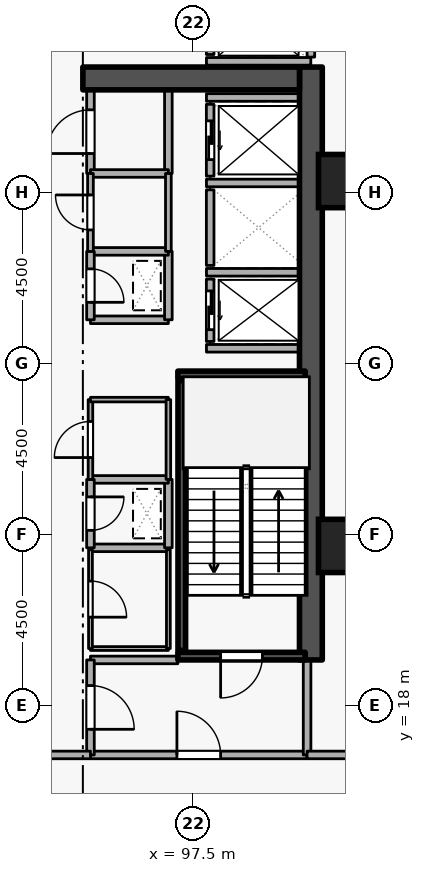
"""IFC4 building model, lengths in metres.
Left out: names, types, materials, properties, quantities, classifications, styles, units other than length and angle.
Written with IfcOpenShell. Run it as: python <this file> out.ifc"""

import sys

from ifc_helpers import new_model, si_unit, direction, frame, frame_2d, origin, origin_2d, place, context, subcontext, project, spatial, rectangle, extrude, element, fill, save


model = new_model("IFC4")
c1 = context("Model", 3, precision=1e-05, world=origin(), true_north=direction((0.0, 1.0)))
c2 = subcontext(c1, "Body", "Model", "MODEL_VIEW")
j1 = project(units=[si_unit("LENGTHUNIT", "METRE"), si_unit("PLANEANGLEUNIT", "RADIAN")], contexts=[c1])
p1 = place(None, origin())
s1 = spatial("IfcSite", under=j1, at=p1, CompositionType="ELEMENT")
p2 = place(p1, origin())
s2 = spatial("IfcBuilding", under=s1, at=p2, CompositionType="ELEMENT")
p3 = place(p2, frame((0.0, 0.0, 71.7)))
s3 = spatial("IfcBuildingStorey", under=s2, at=p3, CompositionType="ELEMENT", Elevation=71.7)
p4 = place(p3, frame((100.6, 19.2, 0.0), z_axis=(0.0, 0.0, 1.0), x_axis=(0.0, 1.0, 0.0)))
e1 = element("IfcWall", 1, at=p4, inside=s3, PredefinedType="SHEAR", context=c2, shape_type="SweptSolid", body=[
    extrude(rectangle(XDim=15.6, YDim=0.6, at=frame_2d((7.8, 0.0))), origin(), (0.0, 0.0, 1.0), 4.2),
])
p5 = place(p3, frame((94.6, 34.5, 0.0), z_axis=(0.0, 0.0, 1.0), x_axis=(1.0, 0.0, 0.0)))
e2 = element("IfcWall", 2, at=p5, inside=s3, PredefinedType="SHEAR", context=c2, shape_type="SweptSolid", body=[
    extrude(rectangle(XDim=5.7, YDim=0.6, at=frame_2d((2.85, 0.0))), origin(), (0.0, 0.0, 1.0), 4.2),
])
for number, where, z_axis, x_axis in (
    (3, (101.5, 22.2, 0.0), (0.0, 0.0, 1.0), (1.0, 0.0, 0.0)),
    (4, (101.5, 31.8, 0.0), (0.0, 0.0, 1.0), (1.0, 0.0, 0.0)),
):
    element("IfcColumn", number, at=place(p3, frame(where, z_axis=z_axis, x_axis=x_axis)), inside=s3, PredefinedType="COLUMN", context=c2, shape_type="SweptSolid", body=[
        extrude(rectangle(XDim=1.4, YDim=1.4, at=origin_2d()), origin(), (0.0, 0.0, 1.0), 4.2),
    ])
p6 = place(p3, frame((97.95, 29.22, 0.0), z_axis=(0.0, 0.0, 1.0), x_axis=(0.0, -1.0, 0.0)))
e5 = element("IfcWall", 5, at=p6, inside=s3, PredefinedType="STANDARD", context=c2, shape_type="SweptSolid", body=[
    extrude(rectangle(XDim=1.64, YDim=0.2, at=frame_2d((0.82, 0.0))), origin(), (0.0, 0.0, 1.0), 3.86),
])
p7 = place(p6, frame((0.31, 0.0, 0.0)))
e6 = element("IfcOpeningElement", 6, at=p7, cuts=e5, PredefinedType="OPENING", context=c2, shape_type="SweptSolid", body=[
    extrude(rectangle(XDim=1.02, YDim=2.06, at=frame_2d((0.51, 1.03))), frame((0.0, 0.11, 0.0), z_axis=(0.0, -1.0, 0.0), x_axis=(1.0, 0.0, 0.0)), (0.0, 0.0, 1.0), 0.22),
])
p8 = place(p3, frame((97.95, 31.57, 0.0), z_axis=(0.0, 0.0, 1.0), x_axis=(0.0, -1.0, 0.0)))
e7 = element("IfcWall", 7, at=p8, inside=s3, PredefinedType="STANDARD", context=c2, shape_type="SweptSolid", body=[
    extrude(rectangle(XDim=1.99, YDim=0.2, at=frame_2d((0.995, 0.0))), origin(), (0.0, 0.0, 1.0), 3.86),
])
p9 = place(p3, frame((97.95, 33.82, 0.0), z_axis=(0.0, 0.0, 1.0), x_axis=(0.0, -1.0, 0.0)))
e8 = element("IfcWall", 8, at=p9, inside=s3, PredefinedType="STANDARD", context=c2, shape_type="SweptSolid", body=[
    extrude(rectangle(XDim=1.89, YDim=0.2, at=frame_2d((0.945, 0.0))), origin(), (0.0, 0.0, 1.0), 3.86),
])
p10 = place(p9, frame((0.435, 0.0, 0.0)))
e9 = element("IfcOpeningElement", 9, at=p10, cuts=e8, PredefinedType="OPENING", context=c2, shape_type="SweptSolid", body=[
    extrude(rectangle(XDim=1.02, YDim=2.06, at=frame_2d((0.51, 1.03))), frame((0.0, 0.11, 0.0), z_axis=(0.0, -1.0, 0.0), x_axis=(1.0, 0.0, 0.0)), (0.0, 0.0, 1.0), 0.22),
])
p11 = place(p3, frame((97.95, 36.87, 0.0), z_axis=(0.0, 0.0, 1.0), x_axis=(0.0, -1.0, 0.0)))
e10 = element("IfcWall", 10, at=p11, inside=s3, PredefinedType="STANDARD", context=c2, shape_type="SweptSolid", body=[
    extrude(rectangle(XDim=1.74, YDim=0.2, at=frame_2d((0.87, 0.0))), origin(), (0.0, 0.0, 1.0), 3.86),
])
p12 = place(p11, frame((0.36, 0.0, 0.0)))
e11 = element("IfcOpeningElement", 11, at=p12, cuts=e10, PredefinedType="OPENING", context=c2, shape_type="SweptSolid", body=[
    extrude(rectangle(XDim=1.02, YDim=2.06, at=frame_2d((0.51, 1.03))), frame((0.0, 0.11, 0.0), z_axis=(0.0, -1.0, 0.0), x_axis=(1.0, 0.0, 0.0)), (0.0, 0.0, 1.0), 0.22),
])
for number, where, z_axis, x_axis in (
    (12, (97.852, 29.4, 0.0), (0.0, 0.0, 1.0), (1.0, 0.0, 0.0)),
    (13, (97.852, 27.4, 0.0), (0.0, 0.0, 1.0), (1.0, 0.0, 0.0)),
    (14, (97.852, 31.75, 0.0), (0.0, 0.0, 1.0), (1.0, 0.0, 0.0)),
    (15, (97.852, 34.0, 0.0), (0.0, 0.0, 1.0), (1.0, 0.0, 0.0)),
):
    element("IfcWall", number, at=place(p3, frame(where, z_axis=z_axis, x_axis=x_axis)), inside=s3, PredefinedType="STANDARD", context=c2, shape_type="SweptSolid", body=[
        extrude(rectangle(XDim=2.436, YDim=0.2, at=frame_2d((1.218, 0.0))), origin(), (0.0, 0.0, 1.0), 3.86),
    ])
p13 = place(p3, frame((97.852, 34.95, 0.0), z_axis=(0.0, 0.0, 1.0), x_axis=(1.0, 0.0, 0.0)))
e16 = element("IfcWall", 16, at=p13, inside=s3, PredefinedType="STANDARD", context=c2, shape_type="SweptSolid", body=[
    extrude(rectangle(XDim=2.746, YDim=0.2, at=frame_2d((1.373, 0.0))), origin(), (0.0, 0.0, 1.0), 3.86),
])
p14 = place(p3, frame((100.6, 35.062, 0.0), z_axis=(0.0, 0.0, 1.0), x_axis=(0.0, 1.0, 0.0)))
e17 = element("IfcWall", 17, at=p14, inside=s3, PredefinedType="STANDARD", context=c2, shape_type="SweptSolid", body=[
    extrude(rectangle(XDim=1.856, YDim=0.2, at=frame_2d((0.928, 0.0))), origin(), (0.0, 0.0, 1.0), 3.86),
])
p15 = place(p3, frame((100.45, 19.3, 0.0), z_axis=(0.0, 0.0, 1.0), x_axis=(-1.0, 0.0, 0.0)))
e18 = element("IfcWall", 18, at=p15, inside=s3, PredefinedType="SHEAR", context=c2, shape_type="SweptSolid", body=[
    extrude(rectangle(XDim=3.35, YDim=0.2, at=frame_2d((1.675, 0.0))), origin(), (0.0, 0.0, 1.0), 4.2),
])
p16 = place(p15, frame((1.125, 0.0, 0.0)))
e19 = element("IfcOpeningElement", 19, at=p16, cuts=e18, PredefinedType="OPENING", context=c2, shape_type="SweptSolid", body=[
    extrude(rectangle(XDim=1.1, YDim=2.1, at=frame_2d((0.55, 1.05))), frame((0.0, 0.11, 0.0), z_axis=(0.0, -1.0, 0.0), x_axis=(1.0, 0.0, 0.0)), (0.0, 0.0, 1.0), 0.22),
])
p17 = place(p3, frame((97.1, 26.7, 0.0), z_axis=(0.0, 0.0, 1.0), x_axis=(1.0, 0.0, 0.0)))
e20 = element("IfcWall", 20, at=p17, inside=s3, PredefinedType="SHEAR", context=c2, shape_type="SweptSolid", body=[
    extrude(rectangle(XDim=3.35, YDim=0.2, at=frame_2d((1.675, 0.0))), origin(), (0.0, 0.0, 1.0), 4.2),
])
p18 = place(p3, frame((97.203, 26.55, 0.0), z_axis=(0.0, 0.0, 1.0), x_axis=(0.0, -1.0, 0.0)))
e21 = element("IfcWall", 21, at=p18, inside=s3, PredefinedType="SHEAR", context=c2, shape_type="SweptSolid", body=[
    extrude(rectangle(XDim=7.1, YDim=0.2, at=frame_2d((3.55, 0.0))), origin(), (0.0, 0.0, 1.0), 4.2),
])
p19 = place(p3, frame((94.8, 16.7, 0.0), z_axis=(0.0, 0.0, 1.0), x_axis=(1.0, 0.0, 0.0)))
e22 = element("IfcWall", 22, at=p19, inside=s3, PredefinedType="STANDARD", context=c2, shape_type="SweptSolid", body=[
    extrude(rectangle(XDim=5.7, YDim=0.2, at=frame_2d((2.85, 0.0))), origin(), (0.0, 0.0, 1.0), 3.86),
])
p20 = place(p19, frame((2.275, 0.0, 0.0)))
e23 = element("IfcOpeningElement", 23, at=p20, cuts=e22, PredefinedType="OPENING", context=c2, shape_type="SweptSolid", body=[
    extrude(rectangle(XDim=1.15, YDim=2.1, at=frame_2d((0.575, 1.05))), frame((0.0, 0.11, 0.0), z_axis=(0.0, -1.0, 0.0), x_axis=(1.0, 0.0, 0.0)), (0.0, 0.0, 1.0), 0.22),
])
p21 = place(p3, frame((100.5, 16.7, 0.0), z_axis=(0.0, 0.0, 1.0), x_axis=(0.0, 1.0, 0.0)))
e24 = element("IfcWall", 24, at=p21, inside=s3, PredefinedType="STANDARD", context=c2, shape_type="SweptSolid", body=[
    extrude(rectangle(XDim=2.5, YDim=0.2, at=frame_2d((1.25, 0.0))), origin(), (0.0, 0.0, 1.0), 3.86),
])
p22 = place(p3, frame((97.1, 19.2, 0.0), z_axis=(0.0, 0.0, 1.0), x_axis=(-1.0, 0.0, 0.0)))
e25 = element("IfcWall", 25, at=p22, inside=s3, PredefinedType="STANDARD", context=c2, shape_type="SweptSolid", body=[
    extrude(rectangle(XDim=2.3, YDim=0.2, at=frame_2d((1.15, 0.0))), origin(), (0.0, 0.0, 1.0), 3.065),
])
p23 = place(p3, frame((94.8, 19.2, 0.0), z_axis=(0.0, 0.0, 1.0), x_axis=(0.0, -1.0, 0.0)))
e26 = element("IfcWall", 26, at=p23, inside=s3, PredefinedType="STANDARD", context=c2, shape_type="SweptSolid", body=[
    extrude(rectangle(XDim=2.5, YDim=0.2, at=frame_2d((1.25, 0.0))), origin(), (0.0, 0.0, 1.0), 3.86),
])
p24 = place(p23, frame((0.675, 0.0, 0.0)))
e27 = element("IfcOpeningElement", 27, at=p24, cuts=e26, PredefinedType="OPENING", context=c2, shape_type="SweptSolid", body=[
    extrude(rectangle(XDim=1.15, YDim=2.1, at=frame_2d((0.575, 1.05))), frame((0.0, 0.11, 0.0), z_axis=(0.0, -1.0, 0.0), x_axis=(1.0, 0.0, 0.0)), (0.0, 0.0, 1.0), 0.22),
])
p25 = place(p3, frame((94.8, 28.15, 0.0), z_axis=(0.0, 0.0, 1.0), x_axis=(1.0, 0.0, 0.0)))
e28 = element("IfcWall", 28, at=p25, inside=s3, PredefinedType="STANDARD", context=c2, shape_type="SweptSolid", body=[
    extrude(rectangle(XDim=2.05, YDim=0.2, at=frame_2d((1.025, 0.0))), origin(), (0.0, 0.0, 1.0), 3.86),
])
p26 = place(p3, frame((96.85, 28.15, 0.0), z_axis=(0.0, 0.0, 1.0), x_axis=(0.0, 1.0, 0.0)))
e29 = element("IfcWall", 29, at=p26, inside=s3, PredefinedType="STANDARD", context=c2, shape_type="SweptSolid", body=[
    extrude(rectangle(XDim=1.8, YDim=0.2, at=frame_2d((0.9, 0.0))), origin(), (0.0, 0.0, 1.0), 3.86),
])
p27 = place(p3, frame((96.85, 29.95, 0.0), z_axis=(0.0, 0.0, 1.0), x_axis=(-1.0, 0.0, 0.0)))
e30 = element("IfcWall", 30, at=p27, inside=s3, PredefinedType="STANDARD", context=c2, shape_type="SweptSolid", body=[
    extrude(rectangle(XDim=2.05, YDim=0.2, at=frame_2d((1.025, 0.0))), origin(), (0.0, 0.0, 1.0), 3.86),
])
p28 = place(p3, frame((94.8, 29.95, 0.0), z_axis=(0.0, 0.0, 1.0), x_axis=(0.0, -1.0, 0.0)))
e31 = element("IfcWall", 31, at=p28, inside=s3, PredefinedType="STANDARD", context=c2, shape_type="SweptSolid", body=[
    extrude(rectangle(XDim=1.8, YDim=0.2, at=frame_2d((0.9, 0.0))), origin(), (0.0, 0.0, 1.0), 3.86),
])
p29 = place(p28, frame((0.46, 0.0, 0.0)))
e32 = element("IfcOpeningElement", 32, at=p29, cuts=e31, PredefinedType="OPENING", context=c2, shape_type="SweptSolid", body=[
    extrude(rectangle(XDim=0.88, YDim=2.04, at=frame_2d((0.44, 1.02))), frame((0.0, 0.11, 0.0), z_axis=(0.0, -1.0, 0.0), x_axis=(1.0, 0.0, 0.0)), (0.0, 0.0, 1.0), 0.22),
])
p30 = place(p3, frame((94.8, 22.15, 0.0), z_axis=(0.0, 0.0, 1.0), x_axis=(1.0, 0.0, 0.0)))
e33 = element("IfcWall", 33, at=p30, inside=s3, PredefinedType="STANDARD", context=c2, shape_type="SweptSolid", body=[
    extrude(rectangle(XDim=2.05, YDim=0.2, at=frame_2d((1.025, 0.0))), origin(), (0.0, 0.0, 1.0), 3.86),
])
p31 = place(p3, frame((96.85, 22.15, 0.0), z_axis=(0.0, 0.0, 1.0), x_axis=(0.0, 1.0, 0.0)))
e34 = element("IfcWall", 34, at=p31, inside=s3, PredefinedType="STANDARD", context=c2, shape_type="SweptSolid", body=[
    extrude(rectangle(XDim=1.8, YDim=0.2, at=frame_2d((0.9, 0.0))), origin(), (0.0, 0.0, 1.0), 3.86),
])
p32 = place(p3, frame((96.85, 23.95, 0.0), z_axis=(0.0, 0.0, 1.0), x_axis=(-1.0, 0.0, 0.0)))
e35 = element("IfcWall", 35, at=p32, inside=s3, PredefinedType="STANDARD", context=c2, shape_type="SweptSolid", body=[
    extrude(rectangle(XDim=2.05, YDim=0.2, at=frame_2d((1.025, 0.0))), origin(), (0.0, 0.0, 1.0), 3.86),
])
p33 = place(p3, frame((94.8, 23.95, 0.0), z_axis=(0.0, 0.0, 1.0), x_axis=(0.0, -1.0, 0.0)))
e36 = element("IfcWall", 36, at=p33, inside=s3, PredefinedType="STANDARD", context=c2, shape_type="SweptSolid", body=[
    extrude(rectangle(XDim=1.8, YDim=0.2, at=frame_2d((0.9, 0.0))), origin(), (0.0, 0.0, 1.0), 3.86),
])
p34 = place(p33, frame((0.46, 0.0, 0.0)))
e37 = element("IfcOpeningElement", 37, at=p34, cuts=e36, PredefinedType="OPENING", context=c2, shape_type="SweptSolid", body=[
    extrude(rectangle(XDim=0.88, YDim=2.04, at=frame_2d((0.44, 1.02))), frame((0.0, 0.11, 0.0), z_axis=(0.0, -1.0, 0.0), x_axis=(1.0, 0.0, 0.0)), (0.0, 0.0, 1.0), 0.22),
])
p35 = place(p3, frame((94.8, 32.0, 0.0), z_axis=(0.0, 0.0, 1.0), x_axis=(0.0, 1.0, 0.0)))
e38 = element("IfcWall", 38, at=p35, inside=s3, PredefinedType="STANDARD", context=c2, shape_type="SweptSolid", body=[
    extrude(rectangle(XDim=2.2, YDim=0.2, at=frame_2d((1.1, 0.0))), origin(), (0.0, 0.0, 1.0), 3.86),
])
p36 = place(p35, frame((0.525, 0.0, 0.0)))
e39 = element("IfcOpeningElement", 39, at=p36, cuts=e38, PredefinedType="OPENING", context=c2, shape_type="SweptSolid", body=[
    extrude(rectangle(XDim=1.15, YDim=2.1, at=frame_2d((0.575, 1.05))), frame((0.0, 0.11, 0.0), z_axis=(0.0, -1.0, 0.0), x_axis=(1.0, 0.0, 0.0)), (0.0, 0.0, 1.0), 0.22),
])
p37 = place(p3, frame((96.85, 34.2, 0.0), z_axis=(0.0, 0.0, 1.0), x_axis=(0.0, -1.0, 0.0)))
e40 = element("IfcWall", 40, at=p37, inside=s3, PredefinedType="STANDARD", context=c2, shape_type="SweptSolid", body=[
    extrude(rectangle(XDim=2.2, YDim=0.2, at=frame_2d((1.1, 0.0))), origin(), (0.0, 0.0, 1.0), 3.86),
])
p38 = place(p3, frame((96.85, 32.0, 0.0), z_axis=(0.0, 0.0, 1.0), x_axis=(-1.0, 0.0, 0.0)))
e41 = element("IfcWall", 41, at=p38, inside=s3, PredefinedType="STANDARD", context=c2, shape_type="SweptSolid", body=[
    extrude(rectangle(XDim=2.05, YDim=0.2, at=frame_2d((1.025, 0.0))), origin(), (0.0, 0.0, 1.0), 3.86),
])
p39 = place(p3, frame((92.9, 16.7, 0.0), z_axis=(0.0, 0.0, 1.0), x_axis=(1.0, 0.0, 0.0)))
e42 = element("IfcWall", 42, at=p39, inside=s3, PredefinedType="STANDARD", context=c2, shape_type="SweptSolid", body=[
    extrude(rectangle(XDim=1.9, YDim=0.2, at=frame_2d((0.95, 0.0))), origin(), (0.0, 0.0, 1.0), 3.86),
])
p40 = place(p3, frame((100.5, 16.7, 0.0), z_axis=(0.0, 0.0, 1.0), x_axis=(1.0, 0.0, 0.0)))
e43 = element("IfcWall", 43, at=p40, inside=s3, PredefinedType="STANDARD", context=c2, shape_type="SweptSolid", body=[
    extrude(rectangle(XDim=2.087, YDim=0.2, at=frame_2d((1.043, 0.0))), origin(), (0.0, 0.0, 1.0), 3.86),
])
p41 = place(p3, frame((94.8, 19.5, 0.0), z_axis=(0.0, 0.0, 1.0), x_axis=(1.0, 0.0, 0.0)))
e44 = element("IfcWall", 44, at=p41, inside=s3, PredefinedType="PARTITIONING", context=c2, shape_type="SweptSolid", body=[
    extrude(rectangle(XDim=2.05, YDim=0.1, at=frame_2d((1.025, 0.0))), origin(), (0.0, 0.0, 1.0), 3.065),
])
p42 = place(p3, frame((96.85, 19.5, 0.0), z_axis=(0.0, 0.0, 1.0), x_axis=(0.0, 1.0, 0.0)))
e45 = element("IfcWall", 45, at=p42, inside=s3, PredefinedType="PARTITIONING", context=c2, shape_type="SweptSolid", body=[
    extrude(rectangle(XDim=2.6, YDim=0.1, at=frame_2d((1.3, 0.0))), origin(), (0.0, 0.0, 1.0), 3.86),
])
p43 = place(p3, frame((94.8, 22.1, 0.0), z_axis=(0.0, 0.0, 1.0), x_axis=(0.0, -1.0, 0.0)))
e46 = element("IfcWall", 46, at=p43, inside=s3, PredefinedType="PARTITIONING", context=c2, shape_type="SweptSolid", body=[
    extrude(rectangle(XDim=2.6, YDim=0.1, at=frame_2d((1.3, 0.0))), origin(), (0.0, 0.0, 1.0), 3.86),
])
p44 = place(p43, frame((0.825, 0.0, 0.0)))
e47 = element("IfcOpeningElement", 47, at=p44, cuts=e46, PredefinedType="OPENING", context=c2, shape_type="SweptSolid", body=[
    extrude(rectangle(XDim=0.95, YDim=2.1, at=frame_2d((0.475, 1.05))), frame((0.0, 0.06, 0.0), z_axis=(0.0, -1.0, 0.0), x_axis=(1.0, 0.0, 0.0)), (0.0, 0.0, 1.0), 0.12),
])
p45 = place(p3, frame((94.8, 23.95, 0.0), z_axis=(0.0, 0.0, 1.0), x_axis=(0.0, 1.0, 0.0)))
e48 = element("IfcWall", 48, at=p45, inside=s3, PredefinedType="PARTITIONING", context=c2, shape_type="SweptSolid", body=[
    extrude(rectangle(XDim=2.1, YDim=0.12, at=frame_2d((1.05, 0.0))), origin(), (0.0, 0.0, 1.0), 3.86),
])
p46 = place(p45, frame((0.575, 0.0, 0.0)))
e49 = element("IfcOpeningElement", 49, at=p46, cuts=e48, PredefinedType="OPENING", context=c2, shape_type="SweptSolid", body=[
    extrude(rectangle(XDim=0.95, YDim=2.1, at=frame_2d((0.475, 1.05))), frame((0.0, 0.07, 0.0), z_axis=(0.0, -1.0, 0.0), x_axis=(1.0, 0.0, 0.0)), (0.0, 0.0, 1.0), 0.14),
])
p47 = place(p3, frame((94.8, 26.05, 0.0), z_axis=(0.0, 0.0, 1.0), x_axis=(1.0, 0.0, 0.0)))
e50 = element("IfcWall", 50, at=p47, inside=s3, PredefinedType="PARTITIONING", context=c2, shape_type="SweptSolid", body=[
    extrude(rectangle(XDim=2.05, YDim=0.12, at=frame_2d((1.025, 0.0))), origin(), (0.0, 0.0, 1.0), 3.86),
])
p48 = place(p3, frame((96.85, 26.05, 0.0), z_axis=(0.0, 0.0, 1.0), x_axis=(0.0, -1.0, 0.0)))
e51 = element("IfcWall", 51, at=p48, inside=s3, PredefinedType="PARTITIONING", context=c2, shape_type="SweptSolid", body=[
    extrude(rectangle(XDim=2.1, YDim=0.12, at=frame_2d((1.05, 0.0))), origin(), (0.0, 0.0, 1.0), 3.86),
])
p49 = place(p3, frame((94.8, 29.95, 0.0), z_axis=(0.0, 0.0, 1.0), x_axis=(0.0, 1.0, 0.0)))
e52 = element("IfcWall", 52, at=p49, inside=s3, PredefinedType="PARTITIONING", context=c2, shape_type="SweptSolid", body=[
    extrude(rectangle(XDim=2.05, YDim=0.15, at=frame_2d((1.025, 0.0))), origin(), (0.0, 0.0, 1.0), 3.86),
])
p50 = place(p49, frame((0.565, 0.0, 0.0)))
e53 = element("IfcOpeningElement", 53, at=p50, cuts=e52, PredefinedType="OPENING", context=c2, shape_type="SweptSolid", body=[
    extrude(rectangle(XDim=0.92, YDim=2.08, at=frame_2d((0.46, 1.04))), frame((0.0, 0.085, 0.0), z_axis=(0.0, -1.0, 0.0), x_axis=(1.0, 0.0, 0.0)), (0.0, 0.0, 1.0), 0.17),
])
p51 = place(p3, frame((96.85, 32.0, 0.0), z_axis=(0.0, 0.0, 1.0), x_axis=(0.0, -1.0, 0.0)))
e54 = element("IfcWall", 54, at=p51, inside=s3, PredefinedType="PARTITIONING", context=c2, shape_type="SweptSolid", body=[
    extrude(rectangle(XDim=2.05, YDim=0.15, at=frame_2d((1.025, 0.0))), origin(), (0.0, 0.0, 1.0), 3.86),
])
p52 = place(p7, origin())
e55 = element("IfcDoor", 55, at=p52, inside=s3, OperationType="SLIDING_TO_LEFT", PredefinedType="DOOR", context=c2, shape_type="SweptSolid", body=[
    extrude(rectangle(XDim=1.02, YDim=2.06, at=frame_2d((0.51, 1.03))), frame((0.0, 0.025, 0.0), z_axis=(0.0, -1.0, 0.0), x_axis=(1.0, 0.0, 0.0)), (0.0, 0.0, 1.0), 0.05),
])
fill(e6, e55)
p53 = place(p10, origin())
e56 = element("IfcDoor", 56, at=p53, inside=s3, OperationType="SLIDING_TO_LEFT", PredefinedType="DOOR", context=c2, shape_type="SweptSolid", body=[
    extrude(rectangle(XDim=1.02, YDim=2.06, at=frame_2d((0.51, 1.03))), frame((0.0, 0.025, 0.0), z_axis=(0.0, -1.0, 0.0), x_axis=(1.0, 0.0, 0.0)), (0.0, 0.0, 1.0), 0.05),
])
fill(e9, e56)
p54 = place(p16, origin())
e57 = element("IfcDoor", 57, at=p54, inside=s3, OperationType="SINGLE_SWING_RIGHT", PredefinedType="DOOR", context=c2, shape_type="SweptSolid", body=[
    extrude(rectangle(XDim=1.1, YDim=2.1, at=frame_2d((0.55, 1.05))), frame((0.0, 0.025, 0.0), z_axis=(0.0, -1.0, 0.0), x_axis=(1.0, 0.0, 0.0)), (0.0, 0.0, 1.0), 0.05),
])
fill(e19, e57)
p55 = place(p24, origin())
e58 = element("IfcDoor", 58, at=p55, inside=s3, OperationType="SINGLE_SWING_RIGHT", PredefinedType="DOOR", context=c2, shape_type="SweptSolid", body=[
    extrude(rectangle(XDim=1.15, YDim=2.1, at=frame_2d((0.575, 1.05))), frame((0.0, 0.025, 0.0), z_axis=(0.0, -1.0, 0.0), x_axis=(1.0, 0.0, 0.0)), (0.0, 0.0, 1.0), 0.05),
])
fill(e27, e58)
p56 = place(p29, origin())
e59 = element("IfcDoor", 59, at=p56, inside=s3, OperationType="SINGLE_SWING_RIGHT", PredefinedType="DOOR", context=c2, shape_type="SweptSolid", body=[
    extrude(rectangle(XDim=0.88, YDim=2.04, at=frame_2d((0.44, 1.02))), frame((0.0, 0.025, 0.0), z_axis=(0.0, -1.0, 0.0), x_axis=(1.0, 0.0, 0.0)), (0.0, 0.0, 1.0), 0.05),
])
fill(e32, e59)
p57 = place(p34, origin())
e60 = element("IfcDoor", 60, at=p57, inside=s3, OperationType="SINGLE_SWING_LEFT", PredefinedType="DOOR", context=c2, shape_type="SweptSolid", body=[
    extrude(rectangle(XDim=0.88, YDim=2.04, at=frame_2d((0.44, 1.02))), frame((0.0, 0.025, 0.0), z_axis=(0.0, -1.0, 0.0), x_axis=(1.0, 0.0, 0.0)), (0.0, 0.0, 1.0), 0.05),
])
fill(e37, e60)
p58 = place(p44, origin())
e61 = element("IfcDoor", 61, at=p58, inside=s3, OperationType="SINGLE_SWING_RIGHT", PredefinedType="DOOR", context=c2, shape_type="SweptSolid", body=[
    extrude(rectangle(XDim=0.95, YDim=2.1, at=frame_2d((0.475, 1.05))), frame((0.0, 0.025, 0.0), z_axis=(0.0, -1.0, 0.0), x_axis=(1.0, 0.0, 0.0)), (0.0, 0.0, 1.0), 0.05),
])
fill(e47, e61)
p59 = place(p46, origin())
e62 = element("IfcDoor", 62, at=p59, inside=s3, OperationType="SINGLE_SWING_LEFT", PredefinedType="DOOR", context=c2, shape_type="SweptSolid", body=[
    extrude(rectangle(XDim=0.95, YDim=2.1, at=frame_2d((0.475, 1.05))), frame((0.0, 0.025, 0.0), z_axis=(0.0, -1.0, 0.0), x_axis=(1.0, 0.0, 0.0)), (0.0, 0.0, 1.0), 0.05),
])
fill(e49, e62)
p60 = place(p50, origin())
e63 = element("IfcDoor", 63, at=p60, inside=s3, OperationType="SINGLE_SWING_RIGHT", PredefinedType="DOOR", context=c2, shape_type="SweptSolid", body=[
    extrude(rectangle(XDim=0.92, YDim=2.08, at=frame_2d((0.46, 1.04))), frame((0.0, 0.025, 0.0), z_axis=(0.0, -1.0, 0.0), x_axis=(1.0, 0.0, 0.0)), (0.0, 0.0, 1.0), 0.05),
])
fill(e53, e63)
p61 = place(p36, origin())
e64 = element("IfcDoor", 64, at=p61, inside=s3, OperationType="SINGLE_SWING_LEFT", PredefinedType="DOOR", context=c2, shape_type="SweptSolid", body=[
    extrude(rectangle(XDim=1.15, YDim=2.1, at=frame_2d((0.575, 1.05))), frame((0.0, 0.025, 0.0), z_axis=(0.0, -1.0, 0.0), x_axis=(1.0, 0.0, 0.0)), (0.0, 0.0, 1.0), 0.05),
])
fill(e39, e64)
p62 = place(p20, origin())
e65 = element("IfcDoor", 65, at=p62, inside=s3, OperationType="SINGLE_SWING_LEFT", PredefinedType="DOOR", context=c2, shape_type="SweptSolid", body=[
    extrude(rectangle(XDim=1.15, YDim=2.1, at=frame_2d((0.575, 1.05))), frame((0.0, 0.025, 0.0), z_axis=(0.0, -1.0, 0.0), x_axis=(1.0, 0.0, 0.0)), (0.0, 0.0, 1.0), 0.05),
])
fill(e23, e65)
save(model, sys.argv[1])
